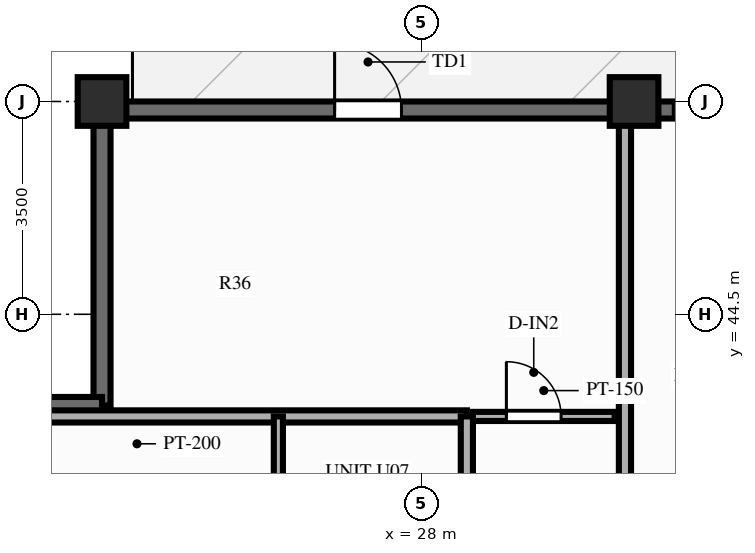
"""IFC4 building model, lengths in metres.
Left out: names, types, materials, properties, quantities, classifications, styles, units other than length and angle.
Written with IfcOpenShell. Run it as: python <this file> out.ifc"""

import sys

from ifc_helpers import new_model, si_unit, direction, frame, frame_2d, origin, origin_2d, place, context, subcontext, project, spatial, rectangle, extrude, source, transform, mapped, element, fill, save


model = new_model("IFC4")
c1 = context("Model", 3, precision=1e-05, world=origin(), true_north=direction((0.0, 1.0)))
c2 = subcontext(c1, "Body", "Model", "MODEL_VIEW")
j1 = project(units=[si_unit("LENGTHUNIT", "METRE"), si_unit("PLANEANGLEUNIT", "RADIAN")], contexts=[c1])
p1 = place(None, origin())
s1 = spatial("IfcSite", under=j1, at=p1, CompositionType="ELEMENT")
p2 = place(p1, origin())
s2 = spatial("IfcBuilding", under=s1, at=p2, CompositionType="ELEMENT")
p3 = place(p2, frame((0.0, 0.0, 172.9)))
s3 = spatial("IfcBuildingStorey", under=s2, at=p3, CompositionType="ELEMENT", Elevation=172.9)
m1 = source(origin(), c2, "Body", "SweptSolid", [
    extrude(rectangle(XDim=0.8, YDim=0.8, at=origin_2d()), origin(), (0.0, 0.0, 1.0), 3.9),
])
for number, where, z_axis, x_axis in (
    (1, (31.5, 48.0, 0.0), (0.0, 0.0, 1.0), (1.0, 0.0, 0.0)),
    (2, (22.75, 48.0, 0.0), (0.0, 0.0, 1.0), (1.0, 0.0, 0.0)),
):
    element("IfcColumn", number, at=place(p3, frame(where, z_axis=z_axis, x_axis=x_axis)), inside=s3, PredefinedType="COLUMN", context=c2, shape_type="MappedRepresentation", body=[
        mapped(m1, transform((0.0, 0.0, 0.0), scale=1.0)),
    ])
p4 = place(p3, frame((22.75, 47.86, 0.0), z_axis=(0.0, 0.0, 1.0), x_axis=(1.0, 0.0, 0.0)))
e3 = element("IfcWall", 3, at=p4, inside=s3, PredefinedType="SOLIDWALL", context=c2, shape_type="SweptSolid", body=[
    extrude(rectangle(XDim=30.5, YDim=0.28, at=frame_2d((15.25, 0.0))), origin(), (0.0, 0.0, 1.0), 2.79),
])
p5 = place(p4, frame((3.825, 0.0, 0.0)))
e4 = element("IfcOpeningElement", 4, at=p5, cuts=e3, PredefinedType="OPENING", context=c2, shape_type="SweptSolid", body=[
    extrude(rectangle(XDim=1.1, YDim=2.15, at=frame_2d((0.55, 1.075))), frame((0.0, 0.152, 0.0), z_axis=(0.0, -1.0, 0.0), x_axis=(1.0, 0.0, 0.0)), (0.0, 0.0, 1.0), 0.304),
])
p6 = place(p4, frame((9.395, 0.0, 0.85)))
e5 = element("IfcOpeningElement", 5, at=p6, cuts=e3, PredefinedType="OPENING", context=c2, shape_type="SweptSolid", body=[
    extrude(rectangle(XDim=0.95, YDim=1.5, at=frame_2d((0.475, 0.75))), frame((0.0, 0.152, 0.0), z_axis=(0.0, -1.0, 0.0), x_axis=(1.0, 0.0, 0.0)), (0.0, 0.0, 1.0), 0.304),
])
p7 = place(p4, frame((11.282, 0.0, 0.85)))
e6 = element("IfcOpeningElement", 6, at=p7, cuts=e3, PredefinedType="OPENING", context=c2, shape_type="SweptSolid", body=[
    extrude(rectangle(XDim=1.5, YDim=1.65, at=frame_2d((0.75, 0.825))), frame((0.0, 0.152, 0.0), z_axis=(0.0, -1.0, 0.0), x_axis=(1.0, 0.0, 0.0)), (0.0, 0.0, 1.0), 0.304),
])
p8 = place(p4, frame((13.92, 0.0, 0.85)))
e7 = element("IfcOpeningElement", 7, at=p8, cuts=e3, PredefinedType="OPENING", context=c2, shape_type="SweptSolid", body=[
    extrude(rectangle(XDim=1.8, YDim=1.65, at=frame_2d((0.9, 0.825))), frame((0.0, 0.152, 0.0), z_axis=(0.0, -1.0, 0.0), x_axis=(1.0, 0.0, 0.0)), (0.0, 0.0, 1.0), 0.304),
])
p9 = place(p4, frame((16.93, 0.0, 0.85)))
e8 = element("IfcOpeningElement", 8, at=p9, cuts=e3, PredefinedType="OPENING", context=c2, shape_type="SweptSolid", body=[
    extrude(rectangle(XDim=1.8, YDim=1.65, at=frame_2d((0.9, 0.825))), frame((0.0, 0.152, 0.0), z_axis=(0.0, -1.0, 0.0), x_axis=(1.0, 0.0, 0.0)), (0.0, 0.0, 1.0), 0.304),
])
p10 = place(p4, frame((19.823, 0.0, 0.85)))
e9 = element("IfcOpeningElement", 9, at=p10, cuts=e3, PredefinedType="OPENING", context=c2, shape_type="SweptSolid", body=[
    extrude(rectangle(XDim=1.2, YDim=1.5, at=frame_2d((0.6, 0.75))), frame((0.0, 0.152, 0.0), z_axis=(0.0, -1.0, 0.0), x_axis=(1.0, 0.0, 0.0)), (0.0, 0.0, 1.0), 0.304),
])
p11 = place(p4, frame((25.225, 0.0, 0.85)))
e10 = element("IfcOpeningElement", 10, at=p11, cuts=e3, PredefinedType="OPENING", context=c2, shape_type="SweptSolid", body=[
    extrude(rectangle(XDim=1.8, YDim=1.65, at=frame_2d((0.9, 0.825))), frame((0.0, 0.152, 0.0), z_axis=(0.0, -1.0, 0.0), x_axis=(1.0, 0.0, 0.0)), (0.0, 0.0, 1.0), 0.304),
])
for number, where, z_axis, x_axis in (
    (11, (22.75, 43.0, 0.0), (0.0, 0.0, 1.0), (0.0, 1.0, 0.0)),
    (12, (17.83, 43.0, 0.0), (0.0, 0.0, 1.0), (1.0, 0.0, 0.0)),
):
    element("IfcWall", number, at=place(p3, frame(where, z_axis=z_axis, x_axis=x_axis)), inside=s3, PredefinedType="SOLIDWALL", context=c2, shape_type="SweptSolid", body=[
        extrude(rectangle(XDim=4.92, YDim=0.28, at=frame_2d((2.46, 0.0))), origin(), (0.0, 0.0, 1.0), 2.79),
    ])
p12 = place(p3, frame((28.85, 42.82, 0.0), z_axis=(0.0, 0.0, 1.0), x_axis=(1.0, 0.0, 0.0)))
e13 = element("IfcWall", 13, at=p12, inside=s3, PredefinedType="PARTITIONING", context=c2, shape_type="SweptSolid", body=[
    extrude(rectangle(XDim=2.33, YDim=0.15, at=frame_2d((1.165, 0.0))), origin(), (0.0, 0.0, 1.0), 3.69),
])
p13 = place(p12, frame((0.55, 0.0, 0.0)))
e14 = element("IfcOpeningElement", 14, at=p13, cuts=e13, PredefinedType="OPENING", context=c2, shape_type="SweptSolid", body=[
    extrude(rectangle(XDim=0.9, YDim=2.1, at=frame_2d((0.45, 1.05))), frame((0.0, 0.087, 0.0), z_axis=(0.0, -1.0, 0.0), x_axis=(1.0, 0.0, 0.0)), (0.0, 0.0, 1.0), 0.174),
])
p14 = place(p3, frame((31.35, 39.05, 0.0), z_axis=(0.0, 0.0, 1.0), x_axis=(0.0, 1.0, 0.0)))
e15 = element("IfcWall", 15, at=p14, inside=s3, PredefinedType="PARTITIONING", context=c2, shape_type="SweptSolid", body=[
    extrude(rectangle(XDim=8.8, YDim=0.2, at=frame_2d((4.4, 0.0))), origin(), (0.0, 0.0, 1.0), 2.79),
])
p15 = place(p3, frame((28.75, 42.82, 0.0), z_axis=(0.0, 0.0, 1.0), x_axis=(-1.0, 0.0, 0.0)))
e16 = element("IfcWall", 16, at=p15, inside=s3, PredefinedType="PARTITIONING", context=c2, shape_type="SweptSolid", body=[
    extrude(rectangle(XDim=10.85, YDim=0.2, at=frame_2d((5.425, 0.0))), origin(), (0.0, 0.0, 1.0), 3.69),
])
p16 = place(p3, frame((28.75, 38.852, 0.0), z_axis=(0.0, 0.0, 1.0), x_axis=(0.0, 1.0, 0.0)))
e17 = element("IfcWall", 17, at=p16, inside=s3, PredefinedType="PARTITIONING", context=c2, shape_type="SweptSolid", body=[
    extrude(rectangle(XDim=3.968, YDim=0.2, at=frame_2d((1.984, 0.0))), origin(), (0.0, 0.0, 1.0), 3.69),
])
p17 = place(p3, frame((25.65, 38.852, 0.0), z_axis=(0.0, 0.0, 1.0), x_axis=(0.0, 1.0, 0.0)))
e18 = element("IfcWall", 18, at=p17, inside=s3, PredefinedType="PARTITIONING", context=c2, shape_type="SweptSolid", body=[
    extrude(rectangle(XDim=3.968, YDim=0.15, at=frame_2d((1.984, 0.0))), origin(), (0.0, 0.0, 1.0), 3.69),
])
m2 = source(origin(), c2, "Body", "SweptSolid", [
    extrude(rectangle(XDim=1.1, YDim=2.15, at=frame_2d((0.55, 1.075))), frame((0.0, 0.025, 0.0), z_axis=(0.0, -1.0, 0.0), x_axis=(1.0, 0.0, 0.0)), (0.0, 0.0, 1.0), 0.05),
])
p18 = place(p5, origin())
e19 = element("IfcDoor", 19, at=p18, inside=s3, OperationType="SINGLE_SWING_LEFT", PredefinedType="DOOR", context=c2, shape_type="MappedRepresentation", body=[
    mapped(m2, transform((0.0, 0.0, 0.0), scale=1.0)),
])
fill(e4, e19)
m3 = source(origin(), c2, "Body", "SweptSolid", [
    extrude(rectangle(XDim=0.95, YDim=1.5, at=frame_2d((0.475, 0.75))), frame((0.0, 0.03, 0.0), z_axis=(0.0, -1.0, 0.0), x_axis=(1.0, 0.0, 0.0)), (0.0, 0.0, 1.0), 0.06),
])
p19 = place(p6, origin())
e20 = element("IfcWindow", 20, at=p19, inside=s3, PartitioningType="SINGLE_PANEL", PredefinedType="WINDOW", context=c2, shape_type="MappedRepresentation", body=[
    mapped(m3, transform((0.0, 0.0, 0.0), scale=1.0)),
])
fill(e5, e20)
m4 = source(origin(), c2, "Body", "SweptSolid", [
    extrude(rectangle(XDim=0.9, YDim=2.1, at=frame_2d((0.45, 1.05))), frame((0.0, 0.025, 0.0), z_axis=(0.0, -1.0, 0.0), x_axis=(1.0, 0.0, 0.0)), (0.0, 0.0, 1.0), 0.05),
])
p20 = place(p13, origin())
e21 = element("IfcDoor", 21, at=p20, inside=s3, OperationType="SINGLE_SWING_LEFT", PredefinedType="DOOR", context=c2, shape_type="MappedRepresentation", body=[
    mapped(m4, transform((0.0, 0.0, 0.0), scale=1.0)),
])
fill(e14, e21)
save(model, sys.argv[1])
